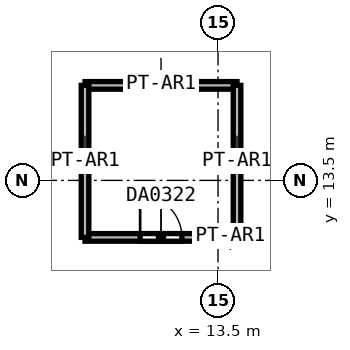
"""IFC4 building model, lengths in metres.
Left out: names, types, materials, properties, quantities, classifications, styles, units other than length and angle.
Written with IfcOpenShell. Run it as: python <this file> out.ifc"""

import sys

from ifc_helpers import new_model, si_unit, direction, frame, frame_2d, origin, place, context, subcontext, project, spatial, rectangle, extrude, element, fill, save


model = new_model("IFC4")
c1 = context("Model", 3, precision=1e-05, world=origin(), true_north=direction((0.0, 1.0)))
c2 = subcontext(c1, "Body", "Model", "MODEL_VIEW")
j1 = project(units=[si_unit("LENGTHUNIT", "METRE"), si_unit("PLANEANGLEUNIT", "RADIAN")], contexts=[c1])
p1 = place(None, origin())
s1 = spatial("IfcSite", under=j1, at=p1, CompositionType="ELEMENT")
p2 = place(p1, origin())
s2 = spatial("IfcBuilding", under=s1, at=p2, CompositionType="ELEMENT")
p3 = place(p2, origin())
s3 = spatial("IfcBuildingStorey", under=s2, at=p3, CompositionType="ELEMENT", Elevation=0.0)
p4 = place(p3, frame((10.0, 12.0, 0.0), z_axis=(0.0, 0.0, 1.0), x_axis=(1.0, 0.0, 0.0)))
e1 = element("IfcWall", 1, at=p4, inside=s3, PredefinedType="PARTITIONING", context=c2, shape_type="SweptSolid", body=[
    extrude(rectangle(XDim=4.0, YDim=0.2, at=frame_2d((2.0, 0.0))), origin(), (0.0, 0.0, 1.0), 11.7),
])
p5 = place(p4, frame((1.45, 0.0, 0.0)))
e2 = element("IfcOpeningElement", 2, at=p5, cuts=e1, PredefinedType="OPENING", context=c2, shape_type="SweptSolid", body=[
    extrude(rectangle(XDim=1.1, YDim=2.4, at=frame_2d((0.55, 1.2))), frame((0.0, 0.1, 0.0), z_axis=(0.0, -1.0, 0.0), x_axis=(1.0, 0.0, 0.0)), (0.0, 0.0, 1.0), 0.2),
])
for number, where, z_axis, x_axis in (
    (3, (14.0, 16.0, 0.0), (0.0, 0.0, 1.0), (-1.0, 0.0, 0.0)),
    (4, (10.0, 16.0, 0.0), (0.0, 0.0, 1.0), (0.0, -1.0, 0.0)),
    (5, (14.0, 12.0, 0.0), (0.0, 0.0, 1.0), (0.0, 1.0, 0.0)),
):
    element("IfcWall", number, at=place(p3, frame(where, z_axis=z_axis, x_axis=x_axis)), inside=s3, PredefinedType="PARTITIONING", context=c2, shape_type="SweptSolid", body=[
        extrude(rectangle(XDim=4.0, YDim=0.2, at=frame_2d((2.0, 0.0))), origin(), (0.0, 0.0, 1.0), 11.7),
    ])
p6 = place(p5, origin())
e6 = element("IfcDoor", 6, at=p6, inside=s3, OperationType="DOUBLE_DOOR_SINGLE_SWING", PredefinedType="DOOR", context=c2, shape_type="SweptSolid", body=[
    extrude(rectangle(XDim=1.1, YDim=2.4, at=frame_2d((0.55, 1.2))), frame((0.0, 0.025, 0.0), z_axis=(0.0, -1.0, 0.0), x_axis=(1.0, 0.0, 0.0)), (0.0, 0.0, 1.0), 0.05),
])
fill(e2, e6)
save(model, sys.argv[1])
